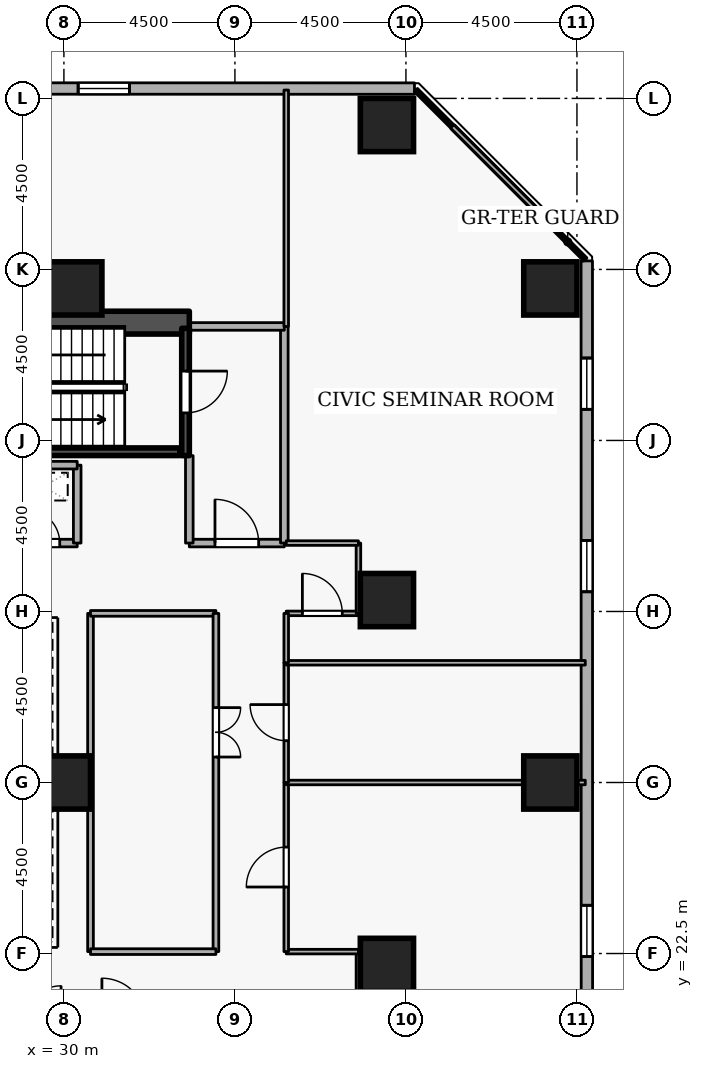
"""IFC4 building model, lengths in metres.
Left out: names, types, materials, properties, quantities, classifications, styles, units other than length and angle.
Written with IfcOpenShell. Run it as: python <this file> out.ifc"""

import sys

from ifc_helpers import new_model, si_unit, direction, frame, frame_2d, origin, origin_2d, place, context, subcontext, project, spatial, rectangle, extrude, element, fill, save


model = new_model("IFC4")
c1 = context("Model", 3, precision=1e-05, world=origin(), true_north=direction((0.0, 1.0)))
c2 = subcontext(c1, "Body", "Model", "MODEL_VIEW")
j1 = project(units=[si_unit("LENGTHUNIT", "METRE"), si_unit("PLANEANGLEUNIT", "RADIAN")], contexts=[c1])
p1 = place(None, origin())
s1 = spatial("IfcSite", under=j1, at=p1, CompositionType="ELEMENT")
p2 = place(p1, origin())
s2 = spatial("IfcBuilding", under=s1, at=p2, CompositionType="ELEMENT")
p3 = place(p2, frame((0.0, 0.0, 45.9)))
s3 = spatial("IfcBuildingStorey", under=s2, at=p3, CompositionType="ELEMENT", Elevation=45.9)
p4 = place(p3, frame((17.7, 39.1, 0.0), z_axis=(0.0, 0.0, 1.0), x_axis=(1.0, 0.0, 0.0)))
e1 = element("IfcWall", 1, at=p4, inside=s3, PredefinedType="SHEAR", context=c2, shape_type="SweptSolid", body=[
    extrude(rectangle(XDim=15.6, YDim=0.6, at=frame_2d((7.8, 0.0))), origin(), (0.0, 0.0, 1.0), 3.6),
])
for number, where, z_axis, x_axis in (
    (2, (42.8, 27.0, 0.0), (0.0, 0.0, 1.0), (1.0, 0.0, 0.0)),
    (3, (42.8, 40.0, 0.0), (0.0, 0.0, 1.0), (1.0, 0.0, 0.0)),
    (4, (38.5, 44.3, 0.0), (0.0, 0.0, 1.0), (1.0, 0.0, 0.0)),
    (5, (38.5, 22.2, 0.0), (0.0, 0.0, 1.0), (1.0, 0.0, 0.0)),
    (6, (38.5, 31.8, 0.0), (0.0, 0.0, 1.0), (1.0, 0.0, 0.0)),
    (7, (30.3, 40.0, 0.0), (0.0, 0.0, 1.0), (1.0, 0.0, 0.0)),
    (8, (30.0, 27.0, 0.0), (0.0, 0.0, 1.0), (1.0, 0.0, 0.0)),
):
    element("IfcColumn", number, at=place(p3, frame(where, z_axis=z_axis, x_axis=x_axis)), inside=s3, PredefinedType="COLUMN", context=c2, shape_type="SweptSolid", body=[
        extrude(rectangle(XDim=1.4, YDim=1.4, at=origin_2d()), origin(), (0.0, 0.0, 1.0), 3.6),
    ])
p5 = place(p3, frame((43.765, 5.319, 0.0), z_axis=(0.0, 0.0, 1.0), x_axis=(-0.00017928314, 0.999999983929, 0.0)))
e9 = element("IfcWall", 9, at=p5, inside=s3, PredefinedType="STANDARD", context=c2, shape_type="SweptSolid", body=[
    extrude(rectangle(XDim=35.406, YDim=0.3, at=frame_2d((17.703, 0.0))), origin(), (0.0, 0.0, 1.0), 2.22),
])
p6 = place(p5, frame((2.7, 0.0, 0.72)))
e10 = element("IfcOpeningElement", 10, at=p6, cuts=e9, PredefinedType="OPENING", context=c2, shape_type="SweptSolid", body=[
    extrude(rectangle(XDim=1.35, YDim=1.05, at=frame_2d((0.675, 0.525))), frame((0.0, 0.16, 0.0), z_axis=(0.0, -1.0, 0.0), x_axis=(1.0, 0.0, 0.0)), (0.0, 0.0, 1.0), 0.32),
])
p7 = place(p5, frame((12.3, 0.0, 0.72)))
e11 = element("IfcOpeningElement", 11, at=p7, cuts=e9, PredefinedType="OPENING", context=c2, shape_type="SweptSolid", body=[
    extrude(rectangle(XDim=1.35, YDim=1.05, at=frame_2d((0.675, 0.525))), frame((0.0, 0.16, 0.0), z_axis=(0.0, -1.0, 0.0), x_axis=(1.0, 0.0, 0.0)), (0.0, 0.0, 1.0), 0.32),
])
p8 = place(p5, frame((17.1, 0.0, 0.72)))
e12 = element("IfcOpeningElement", 12, at=p8, cuts=e9, PredefinedType="OPENING", context=c2, shape_type="SweptSolid", body=[
    extrude(rectangle(XDim=1.35, YDim=1.05, at=frame_2d((0.675, 0.525))), frame((0.0, 0.16, 0.0), z_axis=(0.0, -1.0, 0.0), x_axis=(1.0, 0.0, 0.0)), (0.0, 0.0, 1.0), 0.32),
])
p9 = place(p5, frame((26.7, 0.0, 0.72)))
e13 = element("IfcOpeningElement", 13, at=p9, cuts=e9, PredefinedType="OPENING", context=c2, shape_type="SweptSolid", body=[
    extrude(rectangle(XDim=1.35, YDim=1.05, at=frame_2d((0.675, 0.525))), frame((0.0, 0.16, 0.0), z_axis=(0.0, -1.0, 0.0), x_axis=(1.0, 0.0, 0.0)), (0.0, 0.0, 1.0), 0.32),
])
p10 = place(p5, frame((31.5, 0.0, 0.72)))
e14 = element("IfcOpeningElement", 14, at=p10, cuts=e9, PredefinedType="OPENING", context=c2, shape_type="SweptSolid", body=[
    extrude(rectangle(XDim=1.35, YDim=1.05, at=frame_2d((0.675, 0.525))), frame((0.0, 0.16, 0.0), z_axis=(0.0, -1.0, 0.0), x_axis=(1.0, 0.0, 0.0)), (0.0, 0.0, 1.0), 0.32),
])
p11 = place(p3, frame((39.225, 45.259, 0.0), z_axis=(0.0, 0.0, 1.0), x_axis=(-0.999999983929, 0.00017928314, 0.0)))
e15 = element("IfcWall", 15, at=p11, inside=s3, PredefinedType="STANDARD", context=c2, shape_type="SweptSolid", body=[
    extrude(rectangle(XDim=35.406, YDim=0.3, at=frame_2d((17.703, 0.0))), origin(), (0.0, 0.0, 1.0), 2.22),
])
p12 = place(p11, frame((7.5, 0.0, 0.72)))
e16 = element("IfcOpeningElement", 16, at=p12, cuts=e15, PredefinedType="OPENING", context=c2, shape_type="SweptSolid", body=[
    extrude(rectangle(XDim=1.35, YDim=1.05, at=frame_2d((0.675, 0.525))), frame((0.0, 0.16, 0.0), z_axis=(0.0, -1.0, 0.0), x_axis=(1.0, 0.0, 0.0)), (0.0, 0.0, 1.0), 0.32),
])
p13 = place(p11, frame((17.1, 0.0, 0.72)))
e17 = element("IfcOpeningElement", 17, at=p13, cuts=e15, PredefinedType="OPENING", context=c2, shape_type="SweptSolid", body=[
    extrude(rectangle(XDim=1.35, YDim=1.05, at=frame_2d((0.675, 0.525))), frame((0.0, 0.16, 0.0), z_axis=(0.0, -1.0, 0.0), x_axis=(1.0, 0.0, 0.0)), (0.0, 0.0, 1.0), 0.32),
])
p14 = place(p11, frame((21.9, 0.0, 0.72)))
e18 = element("IfcOpeningElement", 18, at=p14, cuts=e15, PredefinedType="OPENING", context=c2, shape_type="SweptSolid", body=[
    extrude(rectangle(XDim=1.35, YDim=1.05, at=frame_2d((0.675, 0.525))), frame((0.0, 0.16, 0.0), z_axis=(0.0, -1.0, 0.0), x_axis=(1.0, 0.0, 0.0)), (0.0, 0.0, 1.0), 0.32),
])
p15 = place(p11, frame((31.5, 0.0, 0.72)))
e19 = element("IfcOpeningElement", 19, at=p15, cuts=e15, PredefinedType="OPENING", context=c2, shape_type="SweptSolid", body=[
    extrude(rectangle(XDim=1.35, YDim=1.05, at=frame_2d((0.675, 0.525))), frame((0.0, 0.16, 0.0), z_axis=(0.0, -1.0, 0.0), x_axis=(1.0, 0.0, 0.0)), (0.0, 0.0, 1.0), 0.32),
])
p16 = place(p3, frame((33.2, 38.95, 0.0), z_axis=(0.0, 0.0, 1.0), x_axis=(0.0, -1.0, 0.0)))
e20 = element("IfcWall", 20, at=p16, inside=s3, PredefinedType="SHEAR", context=c2, shape_type="SweptSolid", body=[
    extrude(rectangle(XDim=3.35, YDim=0.2, at=frame_2d((1.675, 0.0))), origin(), (0.0, 0.0, 1.0), 3.6),
])
p17 = place(p16, frame((1.125, 0.0, 0.0)))
e21 = element("IfcOpeningElement", 21, at=p17, cuts=e20, PredefinedType="OPENING", context=c2, shape_type="SweptSolid", body=[
    extrude(rectangle(XDim=1.1, YDim=2.1, at=frame_2d((0.55, 1.05))), frame((0.0, 0.11, 0.0), z_axis=(0.0, -1.0, 0.0), x_axis=(1.0, 0.0, 0.0)), (0.0, 0.0, 1.0), 0.22),
])
p18 = place(p3, frame((25.95, 35.703, 0.0), z_axis=(0.0, 0.0, 1.0), x_axis=(1.0, 0.0, 0.0)))
e22 = element("IfcWall", 22, at=p18, inside=s3, PredefinedType="SHEAR", context=c2, shape_type="SweptSolid", body=[
    extrude(rectangle(XDim=7.1, YDim=0.2, at=frame_2d((3.55, 0.0))), origin(), (0.0, 0.0, 1.0), 3.6),
])
p19 = place(p3, frame((33.3, 33.3, 0.0), z_axis=(0.0, 0.0, 1.0), x_axis=(1.0, 0.0, 0.0)))
e23 = element("IfcWall", 23, at=p19, inside=s3, PredefinedType="STANDARD", context=c2, shape_type="SweptSolid", body=[
    extrude(rectangle(XDim=2.5, YDim=0.2, at=frame_2d((1.25, 0.0))), origin(), (0.0, 0.0, 1.0), 3.26),
])
p20 = place(p19, frame((0.675, 0.0, 0.0)))
e24 = element("IfcOpeningElement", 24, at=p20, cuts=e23, PredefinedType="OPENING", context=c2, shape_type="SweptSolid", body=[
    extrude(rectangle(XDim=1.15, YDim=2.1, at=frame_2d((0.575, 1.05))), frame((0.0, 0.11, 0.0), z_axis=(0.0, -1.0, 0.0), x_axis=(1.0, 0.0, 0.0)), (0.0, 0.0, 1.0), 0.22),
])
p21 = place(p3, frame((35.8, 33.3, 0.0), z_axis=(0.0, 0.0, 1.0), x_axis=(0.0, 1.0, 0.0)))
e25 = element("IfcWall", 25, at=p21, inside=s3, PredefinedType="STANDARD", context=c2, shape_type="SweptSolid", body=[
    extrude(rectangle(XDim=5.7, YDim=0.2, at=frame_2d((2.85, 0.0))), origin(), (0.0, 0.0, 1.0), 3.26),
])
p22 = place(p3, frame((35.8, 39.0, 0.0), z_axis=(0.0, 0.0, 1.0), x_axis=(-1.0, 0.0, 0.0)))
e26 = element("IfcWall", 26, at=p22, inside=s3, PredefinedType="STANDARD", context=c2, shape_type="SweptSolid", body=[
    extrude(rectangle(XDim=2.5, YDim=0.2, at=frame_2d((1.25, 0.0))), origin(), (0.0, 0.0, 1.0), 3.26),
])
p23 = place(p3, frame((33.3, 35.6, 0.0), z_axis=(0.0, 0.0, 1.0), x_axis=(0.0, -1.0, 0.0)))
e27 = element("IfcWall", 27, at=p23, inside=s3, PredefinedType="STANDARD", context=c2, shape_type="SweptSolid", body=[
    extrude(rectangle(XDim=2.3, YDim=0.2, at=frame_2d((1.15, 0.0))), origin(), (0.0, 0.0, 1.0), 2.465),
])
p24 = place(p3, frame((28.55, 33.3, 0.0), z_axis=(0.0, 0.0, 1.0), x_axis=(1.0, 0.0, 0.0)))
e28 = element("IfcWall", 28, at=p24, inside=s3, PredefinedType="STANDARD", context=c2, shape_type="SweptSolid", body=[
    extrude(rectangle(XDim=1.8, YDim=0.2, at=frame_2d((0.9, 0.0))), origin(), (0.0, 0.0, 1.0), 3.26),
])
p25 = place(p24, frame((0.46, 0.0, 0.0)))
e29 = element("IfcOpeningElement", 29, at=p25, cuts=e28, PredefinedType="OPENING", context=c2, shape_type="SweptSolid", body=[
    extrude(rectangle(XDim=0.88, YDim=2.04, at=frame_2d((0.44, 1.02))), frame((0.0, 0.11, 0.0), z_axis=(0.0, -1.0, 0.0), x_axis=(1.0, 0.0, 0.0)), (0.0, 0.0, 1.0), 0.22),
])
p26 = place(p3, frame((30.35, 33.3, 0.0), z_axis=(0.0, 0.0, 1.0), x_axis=(0.0, 1.0, 0.0)))
e30 = element("IfcWall", 30, at=p26, inside=s3, PredefinedType="STANDARD", context=c2, shape_type="SweptSolid", body=[
    extrude(rectangle(XDim=2.05, YDim=0.2, at=frame_2d((1.025, 0.0))), origin(), (0.0, 0.0, 1.0), 3.26),
])
p27 = place(p3, frame((30.35, 35.35, 0.0), z_axis=(0.0, 0.0, 1.0), x_axis=(-1.0, 0.0, 0.0)))
e31 = element("IfcWall", 31, at=p27, inside=s3, PredefinedType="STANDARD", context=c2, shape_type="SweptSolid", body=[
    extrude(rectangle(XDim=1.8, YDim=0.2, at=frame_2d((0.9, 0.0))), origin(), (0.0, 0.0, 1.0), 3.26),
])
p28 = place(p3, frame((37.75, 20.7, 0.0), z_axis=(0.0, 0.0, 1.0), x_axis=(0.0, 1.0, 0.0)))
e32 = element("IfcWall", 32, at=p28, inside=s3, PredefinedType="PARTITIONING", context=c2, shape_type="SweptSolid", body=[
    extrude(rectangle(XDim=1.85, YDim=0.12, at=frame_2d((0.925, 0.0))), origin(), (0.0, 0.0, 1.0), 3.26),
])
p29 = place(p3, frame((37.75, 22.55, 0.0), z_axis=(0.0, 0.0, 1.0), x_axis=(-1.0, 0.0, 0.0)))
e33 = element("IfcWall", 33, at=p29, inside=s3, PredefinedType="PARTITIONING", context=c2, shape_type="SweptSolid", body=[
    extrude(rectangle(XDim=1.9, YDim=0.12, at=frame_2d((0.95, 0.0))), origin(), (0.0, 0.0, 1.0), 3.26),
])
p30 = place(p3, frame((35.85, 22.55, 0.0), z_axis=(0.0, 0.0, 1.0), x_axis=(0.0, 1.0, 0.0)))
e34 = element("IfcWall", 34, at=p30, inside=s3, PredefinedType="PARTITIONING", context=c2, shape_type="SweptSolid", body=[
    extrude(rectangle(XDim=4.45, YDim=0.12, at=frame_2d((2.225, 0.0))), origin(), (0.0, 0.0, 1.0), 3.26),
])
p31 = place(p30, frame((1.7, 0.0, 0.0)))
e35 = element("IfcOpeningElement", 35, at=p31, cuts=e34, PredefinedType="OPENING", context=c2, shape_type="SweptSolid", body=[
    extrude(rectangle(XDim=1.05, YDim=2.1, at=frame_2d((0.525, 1.05))), frame((0.0, 0.07, 0.0), z_axis=(0.0, -1.0, 0.0), x_axis=(1.0, 0.0, 0.0)), (0.0, 0.0, 1.0), 0.14),
])
p32 = place(p3, frame((35.85, 27.0, 0.0), z_axis=(0.0, 0.0, 1.0), x_axis=(1.0, 0.0, 0.0)))
e36 = element("IfcWall", 36, at=p32, inside=s3, PredefinedType="PARTITIONING", context=c2, shape_type="SweptSolid", body=[
    extrude(rectangle(XDim=7.87, YDim=0.12, at=frame_2d((3.935, 0.0))), origin(), (0.0, 0.0, 1.0), 1.685),
])
p33 = place(p3, frame((35.85, 27.0, 0.0), z_axis=(0.0, 0.0, 1.0), x_axis=(0.0, 1.0, 0.0)))
e37 = element("IfcWall", 37, at=p33, inside=s3, PredefinedType="PARTITIONING", context=c2, shape_type="SweptSolid", body=[
    extrude(rectangle(XDim=3.15, YDim=0.12, at=frame_2d((1.575, 0.0))), origin(), (0.0, 0.0, 1.0), 3.26),
])
p34 = place(p33, frame((1.1, 0.0, 0.0)))
e38 = element("IfcOpeningElement", 38, at=p34, cuts=e37, PredefinedType="OPENING", context=c2, shape_type="SweptSolid", body=[
    extrude(rectangle(XDim=0.95, YDim=2.1, at=frame_2d((0.475, 1.05))), frame((0.0, 0.07, 0.0), z_axis=(0.0, -1.0, 0.0), x_axis=(1.0, 0.0, 0.0)), (0.0, 0.0, 1.0), 0.14),
])
p35 = place(p3, frame((35.85, 30.15, 0.0), z_axis=(0.0, 0.0, 1.0), x_axis=(1.0, 0.0, 0.0)))
e39 = element("IfcWall", 39, at=p35, inside=s3, PredefinedType="PARTITIONING", context=c2, shape_type="SweptSolid", body=[
    extrude(rectangle(XDim=7.87, YDim=0.12, at=frame_2d((3.935, 0.0))), origin(), (0.0, 0.0, 1.0), 3.26),
])
p36 = place(p3, frame((35.85, 31.45, 0.0), z_axis=(0.0, 0.0, 1.0), x_axis=(1.0, 0.0, 0.0)))
e40 = element("IfcWall", 40, at=p36, inside=s3, PredefinedType="PARTITIONING", context=c2, shape_type="SweptSolid", body=[
    extrude(rectangle(XDim=1.9, YDim=0.12, at=frame_2d((0.95, 0.0))), origin(), (0.0, 0.0, 1.0), 3.26),
])
p37 = place(p36, frame((0.425, 0.0, 0.0)))
e41 = element("IfcOpeningElement", 41, at=p37, cuts=e40, PredefinedType="OPENING", context=c2, shape_type="SweptSolid", body=[
    extrude(rectangle(XDim=1.05, YDim=2.1, at=frame_2d((0.525, 1.05))), frame((0.0, 0.07, 0.0), z_axis=(0.0, -1.0, 0.0), x_axis=(1.0, 0.0, 0.0)), (0.0, 0.0, 1.0), 0.14),
])
p38 = place(p3, frame((37.75, 31.45, 0.0), z_axis=(0.0, 0.0, 1.0), x_axis=(0.0, 1.0, 0.0)))
e42 = element("IfcWall", 42, at=p38, inside=s3, PredefinedType="PARTITIONING", context=c2, shape_type="SweptSolid", body=[
    extrude(rectangle(XDim=1.85, YDim=0.12, at=frame_2d((0.925, 0.0))), origin(), (0.0, 0.0, 1.0), 3.26),
])
p39 = place(p3, frame((37.75, 33.3, 0.0), z_axis=(0.0, 0.0, 1.0), x_axis=(-1.0, 0.0, 0.0)))
e43 = element("IfcWall", 43, at=p39, inside=s3, PredefinedType="PARTITIONING", context=c2, shape_type="SweptSolid", body=[
    extrude(rectangle(XDim=1.9, YDim=0.12, at=frame_2d((0.95, 0.0))), origin(), (0.0, 0.0, 1.0), 3.26),
])
p40 = place(p3, frame((35.85, 39.0, 0.0), z_axis=(0.0, 0.0, 1.0), x_axis=(0.0, 1.0, 0.0)))
e44 = element("IfcWall", 44, at=p40, inside=s3, PredefinedType="PARTITIONING", context=c2, shape_type="SweptSolid", body=[
    extrude(rectangle(XDim=6.22, YDim=0.12, at=frame_2d((3.11, 0.0))), origin(), (0.0, 0.0, 1.0), 3.26),
])
p41 = place(p3, frame((39.261, 45.22, 0.0), z_axis=(0.0, 0.0, 1.0), x_axis=(0.707106781187, -0.707106781187, 0.0)))
e45 = element("IfcWall", 45, at=p41, inside=s3, PredefinedType="PARTITIONING", context=c2, shape_type="SweptSolid", body=[
    extrude(rectangle(XDim=6.305, YDim=0.12, at=frame_2d((3.153, 0.0))), origin(), (0.0, 0.0, 1.0), 3.26),
])
p42 = place(p3, frame((35.85, 30.15, 0.0), z_axis=(0.0, 0.0, 1.0), x_axis=(0.0, 1.0, 0.0)))
e46 = element("IfcWall", 46, at=p42, inside=s3, PredefinedType="PARTITIONING", context=c2, shape_type="SweptSolid", body=[
    extrude(rectangle(XDim=1.3, YDim=0.12, at=frame_2d((0.65, 0.0))), origin(), (0.0, 0.0, 1.0), 3.26),
])
p43 = place(p3, frame((30.7, 22.55, 0.0), z_axis=(0.0, 0.0, 1.0), x_axis=(0.0, 1.0, 0.0)))
e47 = element("IfcWall", 47, at=p43, inside=s3, PredefinedType="PARTITIONING", context=c2, shape_type="SweptSolid", body=[
    extrude(rectangle(XDim=8.9, YDim=0.15, at=frame_2d((4.45, 0.0))), origin(), (0.0, 0.0, 1.0), 3.26),
])
p44 = place(p3, frame((30.7, 31.45, 0.0), z_axis=(0.0, 0.0, 1.0), x_axis=(1.0, 0.0, 0.0)))
e48 = element("IfcWall", 48, at=p44, inside=s3, PredefinedType="PARTITIONING", context=c2, shape_type="SweptSolid", body=[
    extrude(rectangle(XDim=3.3, YDim=0.15, at=frame_2d((1.65, 0.0))), origin(), (0.0, 0.0, 1.0), 3.26),
])
p45 = place(p3, frame((34.0, 31.45, 0.0), z_axis=(0.0, 0.0, 1.0), x_axis=(0.0, -1.0, 0.0)))
e49 = element("IfcWall", 49, at=p45, inside=s3, PredefinedType="PARTITIONING", context=c2, shape_type="SweptSolid", body=[
    extrude(rectangle(XDim=8.9, YDim=0.15, at=frame_2d((4.45, 0.0))), origin(), (0.0, 0.0, 1.0), 3.26),
])
p46 = place(p45, frame((2.48, 0.0, 0.0)))
e50 = element("IfcOpeningElement", 50, at=p46, cuts=e49, PredefinedType="OPENING", context=c2, shape_type="SweptSolid", body=[
    extrude(rectangle(XDim=1.3, YDim=2.12, at=frame_2d((0.65, 1.06))), frame((0.0, 0.085, 0.0), z_axis=(0.0, -1.0, 0.0), x_axis=(1.0, 0.0, 0.0)), (0.0, 0.0, 1.0), 0.17),
])
p47 = place(p3, frame((34.0, 22.55, 0.0), z_axis=(0.0, 0.0, 1.0), x_axis=(-1.0, 0.0, 0.0)))
e51 = element("IfcWall", 51, at=p47, inside=s3, PredefinedType="PARTITIONING", context=c2, shape_type="SweptSolid", body=[
    extrude(rectangle(XDim=3.3, YDim=0.15, at=frame_2d((1.65, 0.0))), origin(), (0.0, 0.0, 1.0), 3.26),
])
p48 = place(p8, origin())
e52 = element("IfcWindow", 52, at=p48, inside=s3, PartitioningType="SINGLE_PANEL", PredefinedType="WINDOW", context=c2, shape_type="SweptSolid", body=[
    extrude(rectangle(XDim=1.35, YDim=1.05, at=frame_2d((0.675, 0.525))), frame((0.0, 0.03, 0.0), z_axis=(0.0, -1.0, 0.0), x_axis=(1.0, 0.0, 0.0)), (0.0, 0.0, 1.0), 0.06),
])
fill(e12, e52)
p49 = place(p9, origin())
e53 = element("IfcWindow", 53, at=p49, inside=s3, PartitioningType="SINGLE_PANEL", PredefinedType="WINDOW", context=c2, shape_type="SweptSolid", body=[
    extrude(rectangle(XDim=1.35, YDim=1.05, at=frame_2d((0.675, 0.525))), frame((0.0, 0.03, 0.0), z_axis=(0.0, -1.0, 0.0), x_axis=(1.0, 0.0, 0.0)), (0.0, 0.0, 1.0), 0.06),
])
fill(e13, e53)
p50 = place(p10, origin())
e54 = element("IfcWindow", 54, at=p50, inside=s3, PartitioningType="SINGLE_PANEL", PredefinedType="WINDOW", context=c2, shape_type="SweptSolid", body=[
    extrude(rectangle(XDim=1.35, YDim=1.05, at=frame_2d((0.675, 0.525))), frame((0.0, 0.03, 0.0), z_axis=(0.0, -1.0, 0.0), x_axis=(1.0, 0.0, 0.0)), (0.0, 0.0, 1.0), 0.06),
])
fill(e14, e54)
p51 = place(p12, origin())
e55 = element("IfcWindow", 55, at=p51, inside=s3, PartitioningType="SINGLE_PANEL", PredefinedType="WINDOW", context=c2, shape_type="SweptSolid", body=[
    extrude(rectangle(XDim=1.35, YDim=1.05, at=frame_2d((0.675, 0.525))), frame((0.0, 0.03, 0.0), z_axis=(0.0, -1.0, 0.0), x_axis=(1.0, 0.0, 0.0)), (0.0, 0.0, 1.0), 0.06),
])
fill(e16, e55)
p52 = place(p17, origin())
e56 = element("IfcDoor", 56, at=p52, inside=s3, OperationType="SINGLE_SWING_LEFT", PredefinedType="DOOR", context=c2, shape_type="SweptSolid", body=[
    extrude(rectangle(XDim=1.1, YDim=2.1, at=frame_2d((0.55, 1.05))), frame((0.0, 0.025, 0.0), z_axis=(0.0, -1.0, 0.0), x_axis=(1.0, 0.0, 0.0)), (0.0, 0.0, 1.0), 0.05),
])
fill(e21, e56)
p53 = place(p20, origin())
e57 = element("IfcDoor", 57, at=p53, inside=s3, OperationType="SINGLE_SWING_LEFT", PredefinedType="DOOR", context=c2, shape_type="SweptSolid", body=[
    extrude(rectangle(XDim=1.15, YDim=2.1, at=frame_2d((0.575, 1.05))), frame((0.0, 0.025, 0.0), z_axis=(0.0, -1.0, 0.0), x_axis=(1.0, 0.0, 0.0)), (0.0, 0.0, 1.0), 0.05),
])
fill(e24, e57)
p54 = place(p25, origin())
e58 = element("IfcDoor", 58, at=p54, inside=s3, OperationType="SINGLE_SWING_LEFT", PredefinedType="DOOR", context=c2, shape_type="SweptSolid", body=[
    extrude(rectangle(XDim=0.88, YDim=2.04, at=frame_2d((0.44, 1.02))), frame((0.0, 0.025, 0.0), z_axis=(0.0, -1.0, 0.0), x_axis=(1.0, 0.0, 0.0)), (0.0, 0.0, 1.0), 0.05),
])
fill(e29, e58)
p55 = place(p31, origin())
e59 = element("IfcDoor", 59, at=p55, inside=s3, OperationType="SINGLE_SWING_LEFT", PredefinedType="DOOR", context=c2, shape_type="SweptSolid", body=[
    extrude(rectangle(XDim=1.05, YDim=2.1, at=frame_2d((0.525, 1.05))), frame((0.0, 0.025, 0.0), z_axis=(0.0, -1.0, 0.0), x_axis=(1.0, 0.0, 0.0)), (0.0, 0.0, 1.0), 0.05),
])
fill(e35, e59)
p56 = place(p34, origin())
e60 = element("IfcDoor", 60, at=p56, inside=s3, OperationType="SINGLE_SWING_RIGHT", PredefinedType="DOOR", context=c2, shape_type="SweptSolid", body=[
    extrude(rectangle(XDim=0.95, YDim=2.1, at=frame_2d((0.475, 1.05))), frame((0.0, 0.025, 0.0), z_axis=(0.0, -1.0, 0.0), x_axis=(1.0, 0.0, 0.0)), (0.0, 0.0, 1.0), 0.05),
])
fill(e38, e60)
p57 = place(p37, origin())
e61 = element("IfcDoor", 61, at=p57, inside=s3, OperationType="SINGLE_SWING_LEFT", PredefinedType="DOOR", context=c2, shape_type="SweptSolid", body=[
    extrude(rectangle(XDim=1.05, YDim=2.1, at=frame_2d((0.525, 1.05))), frame((0.0, 0.025, 0.0), z_axis=(0.0, -1.0, 0.0), x_axis=(1.0, 0.0, 0.0)), (0.0, 0.0, 1.0), 0.05),
])
fill(e41, e61)
p58 = place(p46, origin())
e62 = element("IfcDoor", 62, at=p58, inside=s3, OperationType="DOUBLE_DOOR_SINGLE_SWING", PredefinedType="DOOR", context=c2, shape_type="SweptSolid", body=[
    extrude(rectangle(XDim=1.3, YDim=2.12, at=frame_2d((0.65, 1.06))), frame((0.0, 0.025, 0.0), z_axis=(0.0, -1.0, 0.0), x_axis=(1.0, 0.0, 0.0)), (0.0, 0.0, 1.0), 0.05),
])
fill(e50, e62)
save(model, sys.argv[1])
